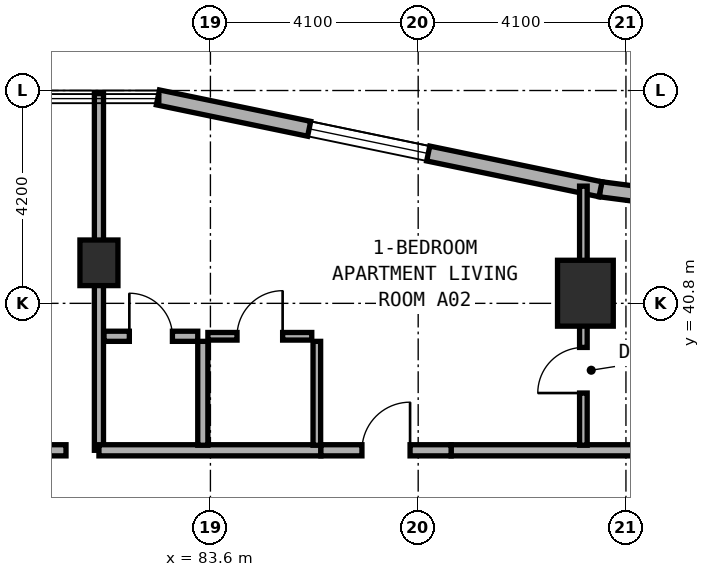
"""IFC4 building model, lengths in metres.
Left out: names, types, materials, properties, quantities, classifications, styles, units other than length and angle.
Written with IfcOpenShell. Run it as: python <this file> out.ifc"""

import sys

from ifc_helpers import new_model, si_unit, direction, frame, frame_2d, origin, origin_2d, place, context, subcontext, project, spatial, rectangle, extrude, element, fill, save


model = new_model("IFC4")
c1 = context("Model", 3, precision=1e-05, world=origin(), true_north=direction((0.0, 1.0)))
c2 = subcontext(c1, "Body", "Model", "MODEL_VIEW")
j1 = project(units=[si_unit("LENGTHUNIT", "METRE"), si_unit("PLANEANGLEUNIT", "RADIAN")], contexts=[c1])
p1 = place(None, origin())
s1 = spatial("IfcSite", under=j1, at=p1, CompositionType="ELEMENT")
p2 = place(p1, origin())
s2 = spatial("IfcBuilding", under=s1, at=p2, CompositionType="ELEMENT")
p3 = place(p2, frame((0.0, 0.0, 38.0)))
s3 = spatial("IfcBuildingStorey", under=s2, at=p3, CompositionType="ELEMENT", Elevation=38.0)
p4 = place(p3, frame((81.4, 41.6, 0.0), z_axis=(0.0, 0.0, 1.0), x_axis=(1.0, 0.0, 0.0)))
e1 = element("IfcColumn", 1, at=p4, inside=s3, PredefinedType="COLUMN", context=c2, shape_type="SweptSolid", body=[
    extrude(rectangle(XDim=0.75, YDim=0.9, at=origin_2d()), origin(), (0.0, 0.0, 1.0), 3.5),
])
p5 = place(p3, frame((91.0, 41.0, 0.0), z_axis=(0.0, 0.0, 1.0), x_axis=(1.0, 0.0, 0.0)))
e2 = element("IfcColumn", 2, at=p5, inside=s3, PredefinedType="COLUMN", context=c2, shape_type="SweptSolid", body=[
    extrude(rectangle(XDim=1.1, YDim=1.3, at=origin_2d()), origin(), (0.0, 0.0, 1.0), 3.5),
])
p6 = place(p3, frame((92.051, 42.953, 0.0), z_axis=(0.0, 0.0, 1.0), x_axis=(-0.991559404866, 0.129653178221, 0.0)))
e3 = element("IfcWall", 3, at=p6, inside=s3, PredefinedType="STANDARD", context=c2, shape_type="SweptSolid", body=[
    extrude(rectangle(XDim=0.764, YDim=0.3, at=frame_2d((0.382, 0.0))), origin(), (0.0, 0.0, 1.0), 3.25),
])
p7 = place(p3, frame((91.298, 43.051, 0.0), z_axis=(0.0, 0.0, 1.0), x_axis=(-0.979128391325, 0.203242695569, 0.0)))
e4 = element("IfcWall", 4, at=p7, inside=s3, PredefinedType="STANDARD", context=c2, shape_type="SweptSolid", body=[
    extrude(rectangle(XDim=8.92, YDim=0.3, at=frame_2d((4.46, 0.0))), origin(), (0.0, 0.0, 1.0), 3.25),
])
p8 = place(p7, frame((3.472, 0.0, 0.8)))
e5 = element("IfcOpeningElement", 5, at=p8, cuts=e4, PredefinedType="OPENING", context=c2, shape_type="SweptSolid", body=[
    extrude(rectangle(XDim=2.4, YDim=1.6, at=frame_2d((1.2, 0.8))), frame((0.0, 0.16, 0.0), z_axis=(0.0, -1.0, 0.0), x_axis=(1.0, 0.0, 0.0)), (0.0, 0.0, 1.0), 0.32),
])
p9 = place(p3, frame((77.45, 37.9, 0.0), z_axis=(0.0, 0.0, 1.0), x_axis=(1.0, 0.0, 0.0)))
e6 = element("IfcWall", 6, at=p9, inside=s3, PredefinedType="SOLIDWALL", context=c2, shape_type="SweptSolid", body=[
    extrude(rectangle(XDim=3.3, YDim=0.22, at=frame_2d((1.65, 0.0))), origin(), (0.0, 0.0, 1.0), 3.22),
])
p10 = place(p9, frame((0.98, 0.0, 0.0)))
e7 = element("IfcOpeningElement", 7, at=p10, cuts=e6, PredefinedType="OPENING", context=c2, shape_type="SweptSolid", body=[
    extrude(rectangle(XDim=1.1, YDim=2.1, at=frame_2d((0.55, 1.05))), frame((0.0, 0.12, 0.0), z_axis=(0.0, -1.0, 0.0), x_axis=(1.0, 0.0, 0.0)), (0.0, 0.0, 1.0), 0.24),
])
p11 = place(p3, frame((81.4, 37.9, 0.0), z_axis=(0.0, 0.0, 1.0), x_axis=(0.0, 1.0, 0.0)))
e8 = element("IfcWall", 8, at=p11, inside=s3, PredefinedType="SOLIDWALL", context=c2, shape_type="SweptSolid", body=[
    extrude(rectangle(XDim=7.04, YDim=0.18, at=frame_2d((3.52, 0.0))), origin(), (0.0, 0.0, 1.0), 2.725),
])
p12 = place(p3, frame((81.4, 37.9, 0.0), z_axis=(0.0, 0.0, 1.0), x_axis=(1.0, 0.0, 0.0)))
e9 = element("IfcWall", 9, at=p12, inside=s3, PredefinedType="SOLIDWALL", context=c2, shape_type="SweptSolid", body=[
    extrude(rectangle(XDim=4.38, YDim=0.22, at=frame_2d((2.19, 0.0))), origin(), (0.0, 0.0, 1.0), 2.725),
])
p13 = place(p3, frame((88.35, 37.9, 0.0), z_axis=(0.0, 0.0, 1.0), x_axis=(1.0, 0.0, 0.0)))
e10 = element("IfcWall", 10, at=p13, inside=s3, PredefinedType="SOLIDWALL", context=c2, shape_type="SweptSolid", body=[
    extrude(rectangle(XDim=7.41, YDim=0.22, at=frame_2d((3.705, 0.0))), origin(), (0.0, 0.0, 1.0), 2.865),
])
p14 = place(p3, frame((85.78, 37.9, 0.0), z_axis=(0.0, 0.0, 1.0), x_axis=(1.0, 0.0, 0.0)))
e11 = element("IfcWall", 11, at=p14, inside=s3, PredefinedType="SOLIDWALL", context=c2, shape_type="SweptSolid", body=[
    extrude(rectangle(XDim=2.57, YDim=0.22, at=frame_2d((1.285, 0.0))), origin(), (0.0, 0.0, 1.0), 3.22),
])
p15 = place(p14, frame((0.81, 0.0, 0.0)))
e12 = element("IfcOpeningElement", 12, at=p15, cuts=e11, PredefinedType="OPENING", context=c2, shape_type="SweptSolid", body=[
    extrude(rectangle(XDim=0.95, YDim=2.1, at=frame_2d((0.475, 1.05))), frame((0.0, 0.12, 0.0), z_axis=(0.0, -1.0, 0.0), x_axis=(1.0, 0.0, 0.0)), (0.0, 0.0, 1.0), 0.24),
])
p16 = place(p3, frame((90.96, 38.0, 0.0), z_axis=(0.0, 0.0, 1.0), x_axis=(0.0, 1.0, 0.0)))
e13 = element("IfcWall", 13, at=p16, inside=s3, PredefinedType="PARTITIONING", context=c2, shape_type="SweptSolid", body=[
    extrude(rectangle(XDim=5.113, YDim=0.15, at=frame_2d((2.557, 0.0))), origin(), (0.0, 0.0, 1.0), 2.865),
])
p17 = place(p16, frame((1.03, 0.0, 0.0)))
e14 = element("IfcOpeningElement", 14, at=p17, cuts=e13, PredefinedType="OPENING", context=c2, shape_type="SweptSolid", body=[
    extrude(rectangle(XDim=0.9, YDim=2.1, at=frame_2d((0.45, 1.05))), frame((0.0, 0.085, 0.0), z_axis=(0.0, -1.0, 0.0), x_axis=(1.0, 0.0, 0.0)), (0.0, 0.0, 1.0), 0.17),
])
p18 = place(p3, frame((83.45, 38.0, 0.0), z_axis=(0.0, 0.0, 1.0), x_axis=(0.0, 1.0, 0.0)))
e15 = element("IfcWall", 15, at=p18, inside=s3, PredefinedType="PLUMBINGWALL", context=c2, shape_type="SweptSolid", body=[
    extrude(rectangle(XDim=2.05, YDim=0.2, at=frame_2d((1.025, 0.0))), origin(), (0.0, 0.0, 1.0), 3.22),
])
p19 = place(p3, frame((85.7, 38.0, 0.0), z_axis=(0.0, 0.0, 1.0), x_axis=(0.0, 1.0, 0.0)))
e16 = element("IfcWall", 16, at=p19, inside=s3, PredefinedType="PARTITIONING", context=c2, shape_type="SweptSolid", body=[
    extrude(rectangle(XDim=2.05, YDim=0.15, at=frame_2d((1.025, 0.0))), origin(), (0.0, 0.0, 1.0), 3.22),
])
p20 = place(p3, frame((81.5, 40.15, 0.0), z_axis=(0.0, 0.0, 1.0), x_axis=(1.0, 0.0, 0.0)))
e17 = element("IfcWall", 17, at=p20, inside=s3, PredefinedType="PLUMBINGWALL", context=c2, shape_type="SweptSolid", body=[
    extrude(rectangle(XDim=1.85, YDim=0.2, at=frame_2d((0.925, 0.0))), origin(), (0.0, 0.0, 1.0), 2.725),
])
p21 = place(p20, frame((0.5, 0.0, 0.0)))
e18 = element("IfcOpeningElement", 18, at=p21, cuts=e17, PredefinedType="OPENING", context=c2, shape_type="SweptSolid", body=[
    extrude(rectangle(XDim=0.85, YDim=2.1, at=frame_2d((0.425, 1.05))), frame((0.0, 0.11, 0.0), z_axis=(0.0, -1.0, 0.0), x_axis=(1.0, 0.0, 0.0)), (0.0, 0.0, 1.0), 0.22),
])
p22 = place(p3, frame((83.55, 40.15, 0.0), z_axis=(0.0, 0.0, 1.0), x_axis=(1.0, 0.0, 0.0)))
e19 = element("IfcWall", 19, at=p22, inside=s3, PredefinedType="PARTITIONING", context=c2, shape_type="SweptSolid", body=[
    extrude(rectangle(XDim=2.05, YDim=0.15, at=frame_2d((1.025, 0.0))), origin(), (0.0, 0.0, 1.0), 3.22),
])
p23 = place(p22, frame((0.575, 0.0, 0.0)))
e20 = element("IfcOpeningElement", 20, at=p23, cuts=e19, PredefinedType="OPENING", context=c2, shape_type="SweptSolid", body=[
    extrude(rectangle(XDim=0.9, YDim=2.1, at=frame_2d((0.45, 1.05))), frame((0.0, 0.085, 0.0), z_axis=(0.0, -1.0, 0.0), x_axis=(1.0, 0.0, 0.0)), (0.0, 0.0, 1.0), 0.17),
])
p24 = place(p8, origin())
e21 = element("IfcWindow", 21, at=p24, inside=s3, PartitioningType="SINGLE_PANEL", PredefinedType="WINDOW", context=c2, shape_type="SweptSolid", body=[
    extrude(rectangle(XDim=2.4, YDim=1.6, at=frame_2d((1.2, 0.8))), frame((0.0, 0.03, 0.0), z_axis=(0.0, -1.0, 0.0), x_axis=(1.0, 0.0, 0.0)), (0.0, 0.0, 1.0), 0.06),
])
fill(e5, e21)
p25 = place(p15, origin())
e22 = element("IfcDoor", 22, at=p25, inside=s3, OperationType="SINGLE_SWING_RIGHT", PredefinedType="DOOR", context=c2, shape_type="SweptSolid", body=[
    extrude(rectangle(XDim=0.95, YDim=2.1, at=frame_2d((0.475, 1.05))), frame((0.0, 0.025, 0.0), z_axis=(0.0, -1.0, 0.0), x_axis=(1.0, 0.0, 0.0)), (0.0, 0.0, 1.0), 0.05),
])
fill(e12, e22)
p26 = place(p17, origin())
e23 = element("IfcDoor", 23, at=p26, inside=s3, OperationType="SINGLE_SWING_LEFT", PredefinedType="DOOR", context=c2, shape_type="SweptSolid", body=[
    extrude(rectangle(XDim=0.9, YDim=2.1, at=frame_2d((0.45, 1.05))), frame((0.0, 0.025, 0.0), z_axis=(0.0, -1.0, 0.0), x_axis=(1.0, 0.0, 0.0)), (0.0, 0.0, 1.0), 0.05),
])
fill(e14, e23)
p27 = place(p21, origin())
e24 = element("IfcDoor", 24, at=p27, inside=s3, OperationType="SINGLE_SWING_LEFT", PredefinedType="DOOR", context=c2, shape_type="SweptSolid", body=[
    extrude(rectangle(XDim=0.85, YDim=2.1, at=frame_2d((0.425, 1.05))), frame((0.0, 0.025, 0.0), z_axis=(0.0, -1.0, 0.0), x_axis=(1.0, 0.0, 0.0)), (0.0, 0.0, 1.0), 0.05),
])
fill(e18, e24)
p28 = place(p23, origin())
e25 = element("IfcDoor", 25, at=p28, inside=s3, OperationType="SINGLE_SWING_RIGHT", PredefinedType="DOOR", context=c2, shape_type="SweptSolid", body=[
    extrude(rectangle(XDim=0.9, YDim=2.1, at=frame_2d((0.45, 1.05))), frame((0.0, 0.025, 0.0), z_axis=(0.0, -1.0, 0.0), x_axis=(1.0, 0.0, 0.0)), (0.0, 0.0, 1.0), 0.05),
])
fill(e20, e25)
save(model, sys.argv[1])
